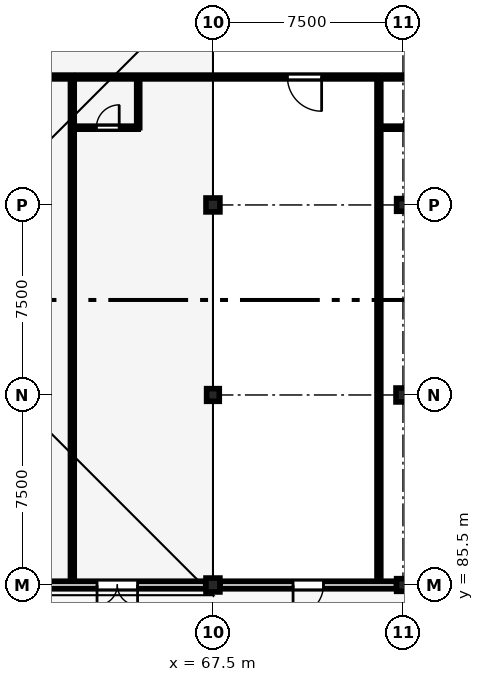
"""IFC4 building model, lengths in metres.
Left out: names, types, materials, properties, quantities, classifications, styles, units other than length and angle.
Written with IfcOpenShell. Run it as: python <this file> out.ifc"""

import sys

from ifc_helpers import new_model, si_unit, direction, frame, frame_2d, origin, origin_2d, place, context, subcontext, project, spatial, rectangle, extrude, element, fill, save


model = new_model("IFC4")
c1 = context("Model", 3, precision=1e-05, world=origin(), true_north=direction((0.0, 1.0)))
c2 = subcontext(c1, "Body", "Model", "MODEL_VIEW")
j1 = project(units=[si_unit("LENGTHUNIT", "METRE"), si_unit("PLANEANGLEUNIT", "RADIAN")], contexts=[c1])
p1 = place(None, origin())
s1 = spatial("IfcSite", under=j1, at=p1, CompositionType="ELEMENT")
p2 = place(p1, origin())
s2 = spatial("IfcBuilding", under=s1, at=p2, CompositionType="ELEMENT")
p3 = place(p2, frame((0.0, 0.0, 17.85)))
s3 = spatial("IfcBuildingStorey", under=s2, at=p3, CompositionType="ELEMENT", Elevation=17.85)
p4 = place(p3, frame((67.5, 85.5, 0.0), z_axis=(0.0, 0.0, 1.0), x_axis=(1.0, 0.0, 0.0)))
e1 = element("IfcColumn", 1, at=p4, inside=s3, PredefinedType="COLUMN", context=c2, shape_type="SweptSolid", body=[
    extrude(rectangle(XDim=0.55, YDim=0.55, at=origin_2d()), origin(), (0.0, 0.0, 1.0), 4.05),
])
p5 = place(p3, frame((67.5, 93.0, 0.0), z_axis=(0.0, 0.0, 1.0), x_axis=(1.0, 0.0, 0.0)))
e2 = element("IfcColumn", 2, at=p5, inside=s3, PredefinedType="COLUMN", context=c2, shape_type="SweptSolid", body=[
    extrude(rectangle(XDim=0.5, YDim=0.5, at=origin_2d()), origin(), (0.0, 0.0, 1.0), 4.05),
])
p6 = place(p3, frame((67.5, 100.5, 0.0), z_axis=(0.0, 0.0, 1.0), x_axis=(1.0, 0.0, 0.0)))
e3 = element("IfcColumn", 3, at=p6, inside=s3, PredefinedType="COLUMN", context=c2, shape_type="SweptSolid", body=[
    extrude(rectangle(XDim=0.55, YDim=0.55, at=origin_2d()), origin(), (0.0, 0.0, 1.0), 4.05),
])
p7 = place(p3, frame((75.0, 85.5, 0.0), z_axis=(0.0, 0.0, 1.0), x_axis=(1.0, 0.0, 0.0)))
e4 = element("IfcColumn", 4, at=p7, inside=s3, PredefinedType="COLUMN", context=c2, shape_type="SweptSolid", body=[
    extrude(rectangle(XDim=0.5, YDim=0.5, at=origin_2d()), origin(), (0.0, 0.0, 1.0), 4.05),
])
p8 = place(p3, frame((75.0, 93.0, 0.0), z_axis=(0.0, 0.0, 1.0), x_axis=(1.0, 0.0, 0.0)))
e5 = element("IfcColumn", 5, at=p8, inside=s3, PredefinedType="COLUMN", context=c2, shape_type="SweptSolid", body=[
    extrude(rectangle(XDim=0.55, YDim=0.55, at=origin_2d()), origin(), (0.0, 0.0, 1.0), 4.05),
])
p9 = place(p3, frame((75.0, 100.5, 0.0), z_axis=(0.0, 0.0, 1.0), x_axis=(1.0, 0.0, 0.0)))
e6 = element("IfcColumn", 6, at=p9, inside=s3, PredefinedType="COLUMN", context=c2, shape_type="SweptSolid", body=[
    extrude(rectangle(XDim=0.5, YDim=0.5, at=origin_2d()), origin(), (0.0, 0.0, 1.0), 4.05),
])
p10 = place(p3, frame((67.215, 85.5, 0.0), z_axis=(0.0, 0.0, 1.0), x_axis=(-1.0, 0.0, 0.0)))
e7 = element("IfcWall", 7, at=p10, inside=s3, PredefinedType="STANDARD", context=c2, shape_type="SweptSolid", body=[
    extrude(rectangle(XDim=6.98, YDim=0.3, at=frame_2d((3.49, 0.0))), origin(), (0.0, 0.0, 1.0), 3.77),
])
p11 = place(p10, frame((2.69, 0.0, 0.0)))
e8 = element("IfcOpeningElement", 8, at=p11, cuts=e7, PredefinedType="OPENING", context=c2, shape_type="SweptSolid", body=[
    extrude(rectangle(XDim=1.6, YDim=2.35, at=frame_2d((0.8, 1.175))), frame((0.0, 0.16, 0.0), z_axis=(0.0, -1.0, 0.0), x_axis=(1.0, 0.0, 0.0)), (0.0, 0.0, 1.0), 0.32),
])
p12 = place(p3, frame((74.74, 85.5, 0.0), z_axis=(0.0, 0.0, 1.0), x_axis=(-1.0, 0.0, 0.0)))
e9 = element("IfcWall", 9, at=p12, inside=s3, PredefinedType="STANDARD", context=c2, shape_type="SweptSolid", body=[
    extrude(rectangle(XDim=6.955, YDim=0.3, at=frame_2d((3.478, 0.0))), origin(), (0.0, 0.0, 1.0), 3.03),
])
p13 = place(p12, frame((2.877, 0.0, 0.0)))
e10 = element("IfcOpeningElement", 10, at=p13, cuts=e9, PredefinedType="OPENING", context=c2, shape_type="SweptSolid", body=[
    extrude(rectangle(XDim=1.2, YDim=2.3, at=frame_2d((0.6, 1.15))), frame((0.0, 0.16, 0.0), z_axis=(0.0, -1.0, 0.0), x_axis=(1.0, 0.0, 0.0)), (0.0, 0.0, 1.0), 0.32),
])
p14 = place(p3, frame((61.95, 105.55, 0.0), z_axis=(0.0, 0.0, 1.0), x_axis=(-1.0, 0.0, 0.0)))
e11 = element("IfcWall", 11, at=p14, inside=s3, PredefinedType="PARTITIONING", context=c2, shape_type="SweptSolid", body=[
    extrude(rectangle(XDim=11.9, YDim=0.15, at=frame_2d((5.95, 0.0))), origin(), (0.0, 0.0, 1.0), 3.755),
])
p15 = place(p14, frame((5.275, 0.0, 0.0)))
e12 = element("IfcOpeningElement", 12, at=p15, cuts=e11, PredefinedType="OPENING", context=c2, shape_type="SweptSolid", body=[
    extrude(rectangle(XDim=1.35, YDim=2.25, at=frame_2d((0.675, 1.125))), frame((0.0, 0.085, 0.0), z_axis=(0.0, -1.0, 0.0), x_axis=(1.0, 0.0, 0.0)), (0.0, 0.0, 1.0), 0.17),
])
p16 = place(p3, frame((74.05, 105.55, 0.0), z_axis=(0.0, 0.0, 1.0), x_axis=(-1.0, 0.0, 0.0)))
e13 = element("IfcWall", 13, at=p16, inside=s3, PredefinedType="PARTITIONING", context=c2, shape_type="SweptSolid", body=[
    extrude(rectangle(XDim=11.9, YDim=0.15, at=frame_2d((5.95, 0.0))), origin(), (0.0, 0.0, 1.0), 3.755),
])
p17 = place(p16, frame((2.26, 0.0, 0.0)))
e14 = element("IfcOpeningElement", 14, at=p17, cuts=e13, PredefinedType="OPENING", context=c2, shape_type="SweptSolid", body=[
    extrude(rectangle(XDim=1.35, YDim=2.25, at=frame_2d((0.675, 1.125))), frame((0.0, 0.085, 0.0), z_axis=(0.0, -1.0, 0.0), x_axis=(1.0, 0.0, 0.0)), (0.0, 0.0, 1.0), 0.17),
])
p18 = place(p3, frame((62.15, 103.55, 0.0), z_axis=(0.0, 0.0, 1.0), x_axis=(1.0, 0.0, 0.0)))
e15 = element("IfcWall", 15, at=p18, inside=s3, PredefinedType="PARTITIONING", context=c2, shape_type="SweptSolid", body=[
    extrude(rectangle(XDim=2.4, YDim=0.12, at=frame_2d((1.2, 0.0))), origin(), (0.0, 0.0, 1.0), 3.755),
])
p19 = place(p18, frame((0.75, 0.0, 0.0)))
e16 = element("IfcOpeningElement", 16, at=p19, cuts=e15, PredefinedType="OPENING", context=c2, shape_type="SweptSolid", body=[
    extrude(rectangle(XDim=0.9, YDim=2.1, at=frame_2d((0.45, 1.05))), frame((0.0, 0.07, 0.0), z_axis=(0.0, -1.0, 0.0), x_axis=(1.0, 0.0, 0.0)), (0.0, 0.0, 1.0), 0.14),
])
p20 = place(p3, frame((64.55, 103.55, 0.0), z_axis=(0.0, 0.0, 1.0), x_axis=(0.0, 1.0, 0.0)))
e17 = element("IfcWall", 17, at=p20, inside=s3, PredefinedType="PARTITIONING", context=c2, shape_type="SweptSolid", body=[
    extrude(rectangle(XDim=2.0, YDim=0.12, at=frame_2d((1.0, 0.0))), origin(), (0.0, 0.0, 1.0), 3.755),
])
p21 = place(p3, frame((86.15, 105.55, 0.0), z_axis=(0.0, 0.0, 1.0), x_axis=(-1.0, 0.0, 0.0)))
e18 = element("IfcWall", 18, at=p21, inside=s3, PredefinedType="PARTITIONING", context=c2, shape_type="SweptSolid", body=[
    extrude(rectangle(XDim=11.9, YDim=0.15, at=frame_2d((5.95, 0.0))), origin(), (0.0, 0.0, 1.0), 3.755),
])
p22 = place(p21, frame((6.28, 0.0, 0.0)))
e19 = element("IfcOpeningElement", 19, at=p22, cuts=e18, PredefinedType="OPENING", context=c2, shape_type="SweptSolid", body=[
    extrude(rectangle(XDim=1.35, YDim=2.25, at=frame_2d((0.675, 1.125))), frame((0.0, 0.085, 0.0), z_axis=(0.0, -1.0, 0.0), x_axis=(1.0, 0.0, 0.0)), (0.0, 0.0, 1.0), 0.17),
])
p23 = place(p3, frame((74.25, 103.55, 0.0), z_axis=(0.0, 0.0, 1.0), x_axis=(1.0, 0.0, 0.0)))
e20 = element("IfcWall", 20, at=p23, inside=s3, PredefinedType="PARTITIONING", context=c2, shape_type="SweptSolid", body=[
    extrude(rectangle(XDim=2.4, YDim=0.12, at=frame_2d((1.2, 0.0))), origin(), (0.0, 0.0, 1.0), 3.755),
])
p24 = place(p23, frame((0.75, 0.0, 0.0)))
e21 = element("IfcOpeningElement", 21, at=p24, cuts=e20, PredefinedType="OPENING", context=c2, shape_type="SweptSolid", body=[
    extrude(rectangle(XDim=0.9, YDim=2.1, at=frame_2d((0.45, 1.05))), frame((0.0, 0.07, 0.0), z_axis=(0.0, -1.0, 0.0), x_axis=(1.0, 0.0, 0.0)), (0.0, 0.0, 1.0), 0.14),
])
for number, where, z_axis, x_axis in (
    (22, (61.95, 85.85, 0.0), (0.0, 0.0, 1.0), (0.0, 1.0, 0.0)),
    (23, (74.05, 85.85, 0.0), (0.0, 0.0, 1.0), (0.0, 1.0, 0.0)),
):
    element("IfcWall", number, at=place(p3, frame(where, z_axis=z_axis, x_axis=x_axis)), inside=s3, PredefinedType="PARTITIONING", context=c2, shape_type="SweptSolid", body=[
        extrude(rectangle(XDim=19.7, YDim=0.15, at=frame_2d((9.85, 0.0))), origin(), (0.0, 0.0, 1.0), 3.755),
    ])
p25 = place(p11, origin())
e24 = element("IfcDoor", 24, at=p25, inside=s3, OperationType="DOUBLE_DOOR_SINGLE_SWING", PredefinedType="DOOR", context=c2, shape_type="SweptSolid", body=[
    extrude(rectangle(XDim=1.6, YDim=2.35, at=frame_2d((0.8, 1.175))), frame((0.0, 0.025, 0.0), z_axis=(0.0, -1.0, 0.0), x_axis=(1.0, 0.0, 0.0)), (0.0, 0.0, 1.0), 0.05),
])
fill(e8, e24)
p26 = place(p13, origin())
e25 = element("IfcDoor", 25, at=p26, inside=s3, OperationType="SINGLE_SWING_RIGHT", PredefinedType="DOOR", context=c2, shape_type="SweptSolid", body=[
    extrude(rectangle(XDim=1.2, YDim=2.3, at=frame_2d((0.6, 1.15))), frame((0.0, 0.025, 0.0), z_axis=(0.0, -1.0, 0.0), x_axis=(1.0, 0.0, 0.0)), (0.0, 0.0, 1.0), 0.05),
])
fill(e10, e25)
p27 = place(p17, origin())
e26 = element("IfcDoor", 26, at=p27, inside=s3, OperationType="SINGLE_SWING_LEFT", PredefinedType="DOOR", context=c2, shape_type="SweptSolid", body=[
    extrude(rectangle(XDim=1.35, YDim=2.25, at=frame_2d((0.675, 1.125))), frame((0.0, 0.025, 0.0), z_axis=(0.0, -1.0, 0.0), x_axis=(1.0, 0.0, 0.0)), (0.0, 0.0, 1.0), 0.05),
])
fill(e14, e26)
p28 = place(p19, origin())
e27 = element("IfcDoor", 27, at=p28, inside=s3, OperationType="SINGLE_SWING_RIGHT", PredefinedType="DOOR", context=c2, shape_type="SweptSolid", body=[
    extrude(rectangle(XDim=0.9, YDim=2.1, at=frame_2d((0.45, 1.05))), frame((0.0, 0.025, 0.0), z_axis=(0.0, -1.0, 0.0), x_axis=(1.0, 0.0, 0.0)), (0.0, 0.0, 1.0), 0.05),
])
fill(e16, e27)
p29 = place(p24, origin())
e28 = element("IfcDoor", 28, at=p29, inside=s3, OperationType="SINGLE_SWING_RIGHT", PredefinedType="DOOR", context=c2, shape_type="SweptSolid", body=[
    extrude(rectangle(XDim=0.9, YDim=2.1, at=frame_2d((0.45, 1.05))), frame((0.0, 0.025, 0.0), z_axis=(0.0, -1.0, 0.0), x_axis=(1.0, 0.0, 0.0)), (0.0, 0.0, 1.0), 0.05),
])
fill(e21, e28)
save(model, sys.argv[1])
